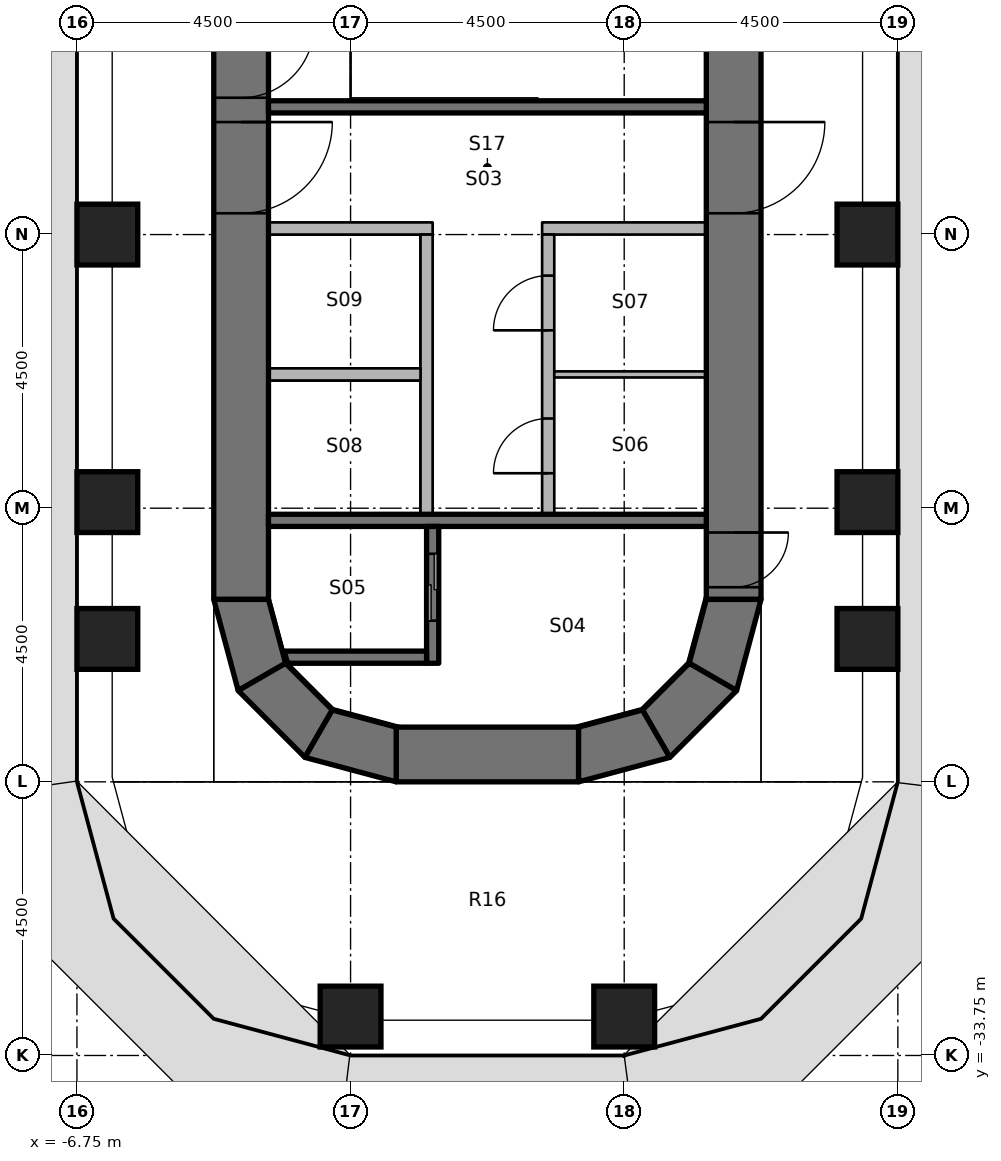
"""IFC4 building model, lengths in metres.
Left out: names, types, materials, properties, quantities, classifications, styles, units other than length and angle.
Written with IfcOpenShell. Run it as: python <this file> out.ifc"""

import sys

from ifc_helpers import new_model, si_unit, direction, frame, frame_2d, origin, origin_2d, place, context, subcontext, project, spatial, polyline, rectangle, outline, extrude, element, fill, save


model = new_model("IFC4")
c1 = context("Model", 3, precision=1e-05, world=origin(), true_north=direction((0.0, 1.0)))
c2 = subcontext(c1, "Body", "Model", "MODEL_VIEW")
j1 = project(units=[si_unit("LENGTHUNIT", "METRE"), si_unit("PLANEANGLEUNIT", "RADIAN")], contexts=[c1])
p1 = place(None, origin())
s1 = spatial("IfcSite", under=j1, at=p1, CompositionType="ELEMENT")
p2 = place(p1, origin())
s2 = spatial("IfcBuilding", under=s1, at=p2, CompositionType="ELEMENT")
p3 = place(p2, frame((0.0, 0.0, 56.4)))
s3 = spatial("IfcBuildingStorey", under=s2, at=p3, CompositionType="ELEMENT", Elevation=56.4)
for number, where, z_axis, x_axis in (
    (1, (-6.25, -26.9, 0.0), (0.0, 0.0, 1.0), (1.0, 0.0, 0.0)),
    (2, (-6.25, -24.65, 0.0), (0.0, 0.0, 1.0), (1.0, 0.0, 0.0)),
    (3, (-6.25, -20.25, 0.0), (0.0, 0.0, 1.0), (1.0, 0.0, 0.0)),
    (4, (-2.25, -33.11, 0.0), (0.0, 0.0, 1.0), (1.0, 0.0, 0.0)),
    (5, (2.25, -33.11, 0.0), (0.0, 0.0, 1.0), (1.0, 0.0, 0.0)),
    (6, (6.25, -26.9, 0.0), (0.0, 0.0, 1.0), (1.0, 0.0, 0.0)),
    (7, (6.25, -24.65, 0.0), (0.0, 0.0, 1.0), (1.0, 0.0, 0.0)),
    (8, (6.25, -20.25, 0.0), (0.0, 0.0, 1.0), (1.0, 0.0, 0.0)),
):
    element("IfcColumn", number, at=place(p3, frame(where, z_axis=z_axis, x_axis=x_axis)), inside=s3, PredefinedType="COLUMN", context=c2, shape_type="SweptSolid", body=[
        extrude(rectangle(XDim=1.0, YDim=1.0, at=origin_2d()), origin(), (0.0, 0.0, 1.0), 4.05),
    ])
p4 = place(p3, frame((-4.05, -11.25, 0.0), z_axis=(0.0, 0.0, 1.0), x_axis=(0.0, -1.0, 0.0)))
e9 = element("IfcWall", 9, at=p4, inside=s3, PredefinedType="SHEAR", context=c2, shape_type="SweptSolid", body=[
    extrude(rectangle(XDim=15.0, YDim=0.9, at=frame_2d((7.5, 0.0))), origin(), (0.0, 0.0, 1.0), 4.2),
])
p5 = place(p4, frame((7.15, 0.0, 0.0)))
e10 = element("IfcOpeningElement", 10, at=p5, cuts=e9, PredefinedType="OPENING", context=c2, shape_type="SweptSolid", body=[
    extrude(rectangle(XDim=1.5, YDim=2.3, at=frame_2d((0.75, 1.15))), frame((0.0, 0.46, 0.0), z_axis=(0.0, -1.0, 0.0), x_axis=(1.0, 0.0, 0.0)), (0.0, 0.0, 1.0), 0.92),
])
p6 = place(p4, frame((5.55, 0.0, 0.0)))
e11 = element("IfcOpeningElement", 11, at=p6, cuts=e9, PredefinedType="OPENING", context=c2, shape_type="SweptSolid", body=[
    extrude(rectangle(XDim=1.2, YDim=2.1, at=frame_2d((0.6, 1.05))), frame((0.0, 0.46, 0.0), z_axis=(0.0, -1.0, 0.0), x_axis=(1.0, 0.0, 0.0)), (0.0, 0.0, 1.0), 0.92),
])
p7 = place(p3, frame((4.05, -11.25, 0.0), z_axis=(0.0, 0.0, 1.0), x_axis=(0.0, -1.0, 0.0)))
e12 = element("IfcWall", 12, at=p7, inside=s3, PredefinedType="SHEAR", context=c2, shape_type="SweptSolid", body=[
    extrude(rectangle(XDim=15.0, YDim=0.9, at=frame_2d((7.5, 0.0))), origin(), (0.0, 0.0, 1.0), 4.2),
])
p8 = place(p7, frame((7.15, 0.0, 0.0)))
e13 = element("IfcOpeningElement", 13, at=p8, cuts=e12, PredefinedType="OPENING", context=c2, shape_type="SweptSolid", body=[
    extrude(rectangle(XDim=1.5, YDim=2.3, at=frame_2d((0.75, 1.15))), frame((0.0, 0.46, 0.0), z_axis=(0.0, -1.0, 0.0), x_axis=(1.0, 0.0, 0.0)), (0.0, 0.0, 1.0), 0.92),
])
p9 = place(p7, frame((13.9, 0.0, 0.0)))
e14 = element("IfcOpeningElement", 14, at=p9, cuts=e12, PredefinedType="OPENING", context=c2, shape_type="SweptSolid", body=[
    extrude(rectangle(XDim=0.9, YDim=2.1, at=frame_2d((0.45, 1.05))), frame((0.0, 0.46, 0.0), z_axis=(0.0, -1.0, 0.0), x_axis=(1.0, 0.0, 0.0)), (0.0, 0.0, 1.0), 0.92),
])
p10 = place(p7, frame((1.15, 0.0, 0.0)))
e15 = element("IfcOpeningElement", 15, at=p10, cuts=e12, PredefinedType="OPENING", context=c2, shape_type="SweptSolid", body=[
    extrude(rectangle(XDim=1.2, YDim=2.1, at=frame_2d((0.6, 1.05))), frame((0.0, 0.46, 0.0), z_axis=(0.0, -1.0, 0.0), x_axis=(1.0, 0.0, 0.0)), (0.0, 0.0, 1.0), 0.92),
])
p11 = place(p3, frame((-1.5, -28.8, 0.0), z_axis=(0.0, 0.0, 1.0), x_axis=(1.0, 0.0, 0.0)))
e16 = element("IfcWall", 16, at=p11, inside=s3, PredefinedType="SHEAR", context=c2, shape_type="SweptSolid", body=[
    extrude(rectangle(XDim=3.0, YDim=0.9, at=frame_2d((1.5, 0.0))), origin(), (0.0, 0.0, 1.0), 4.2),
])
p12 = place(p3, origin())
e17 = element("IfcWall", 17, at=p12, inside=s3, PredefinedType="SHEAR", context=c2, shape_type="SweptSolid", body=[
    extrude(outline(polyline([(-4.5, -26.25), (-4.098, -27.75), (-3.319, -27.3), (-3.6, -26.25), (-4.5, -26.25)])), origin(), (0.0, 0.0, 1.0), 4.2),
])
p13 = place(p3, origin())
e18 = element("IfcWall", 18, at=p13, inside=s3, PredefinedType="SHEAR", context=c2, shape_type="SweptSolid", body=[
    extrude(outline(polyline([(-4.098, -27.75), (-3.0, -28.848), (-2.55, -28.069), (-3.319, -27.3), (-4.098, -27.75)])), origin(), (0.0, 0.0, 1.0), 4.2),
])
p14 = place(p3, origin())
e19 = element("IfcWall", 19, at=p14, inside=s3, PredefinedType="SHEAR", context=c2, shape_type="SweptSolid", body=[
    extrude(outline(polyline([(-3.0, -28.848), (-1.5, -29.25), (-1.5, -28.35), (-2.55, -28.069), (-3.0, -28.848)])), origin(), (0.0, 0.0, 1.0), 4.2),
])
p15 = place(p3, origin())
e20 = element("IfcWall", 20, at=p15, inside=s3, PredefinedType="SHEAR", context=c2, shape_type="SweptSolid", body=[
    extrude(outline(polyline([(4.5, -26.25), (4.098, -27.75), (3.319, -27.3), (3.6, -26.25), (4.5, -26.25)])), origin(), (0.0, 0.0, 1.0), 4.2),
])
p16 = place(p3, origin())
e21 = element("IfcWall", 21, at=p16, inside=s3, PredefinedType="SHEAR", context=c2, shape_type="SweptSolid", body=[
    extrude(outline(polyline([(4.098, -27.75), (3.0, -28.848), (2.55, -28.069), (3.319, -27.3), (4.098, -27.75)])), origin(), (0.0, 0.0, 1.0), 4.2),
])
p17 = place(p3, origin())
e22 = element("IfcWall", 22, at=p17, inside=s3, PredefinedType="SHEAR", context=c2, shape_type="SweptSolid", body=[
    extrude(outline(polyline([(3.0, -28.848), (1.5, -29.25), (1.5, -28.35), (2.55, -28.069), (3.0, -28.848)])), origin(), (0.0, 0.0, 1.0), 4.2),
])
p18 = place(p3, frame((3.6, -24.95, 0.0), z_axis=(0.0, 0.0, 1.0), x_axis=(-1.0, 0.0, 0.0)))
e23 = element("IfcWall", 23, at=p18, inside=s3, PredefinedType="SHEAR", context=c2, shape_type="SweptSolid", body=[
    extrude(rectangle(XDim=7.2, YDim=0.2, at=frame_2d((3.6, 0.0))), origin(), (0.0, 0.0, 1.0), 4.05),
])
p19 = place(p3, frame((-0.9, -27.3, 0.0), z_axis=(0.0, 0.0, 1.0), x_axis=(0.0, 1.0, 0.0)))
e24 = element("IfcWall", 24, at=p19, inside=s3, PredefinedType="SHEAR", context=c2, shape_type="SweptSolid", body=[
    extrude(rectangle(XDim=2.25, YDim=0.2, at=frame_2d((1.125, 0.0))), origin(), (0.0, 0.0, 1.0), 4.05),
])
p20 = place(p19, frame((0.7, 0.0, 0.0)))
e25 = element("IfcOpeningElement", 25, at=p20, cuts=e24, PredefinedType="OPENING", context=c2, shape_type="SweptSolid", body=[
    extrude(rectangle(XDim=1.1, YDim=2.3, at=frame_2d((0.55, 1.15))), frame((0.0, 0.11, 0.0), z_axis=(0.0, -1.0, 0.0), x_axis=(1.0, 0.0, 0.0)), (0.0, 0.0, 1.0), 0.22),
])
p21 = place(p3, origin())
e26 = element("IfcWall", 26, at=p21, inside=s3, PredefinedType="SHEAR", context=c2, shape_type="SweptSolid", body=[
    extrude(outline(polyline([(-1.0, -27.1), (-3.341, -27.1), (-3.291, -27.284), (-3.275, -27.3), (-1.0, -27.3), (-1.0, -27.1)])), origin(), (0.0, 0.0, 1.0), 4.05),
])
p22 = place(p3, frame((3.6, -18.15, 0.0), z_axis=(0.0, 0.0, 1.0), x_axis=(-1.0, 0.0, 0.0)))
e27 = element("IfcWall", 27, at=p22, inside=s3, PredefinedType="SHEAR", context=c2, shape_type="SweptSolid", body=[
    extrude(rectangle(XDim=7.2, YDim=0.2, at=frame_2d((3.6, 0.0))), origin(), (0.0, 0.0, 1.0), 4.05),
])
p23 = place(p3, frame((3.6, -20.15, 0.0), z_axis=(0.0, 0.0, 1.0), x_axis=(-1.0, 0.0, 0.0)))
e28 = element("IfcWall", 28, at=p23, inside=s3, PredefinedType="PARTITIONING", context=c2, shape_type="SweptSolid", body=[
    extrude(rectangle(XDim=2.7, YDim=0.2, at=frame_2d((1.35, 0.0))), origin(), (0.0, 0.0, 1.0), 4.05),
])
p24 = place(p3, frame((1.0, -24.85, 0.0), z_axis=(0.0, 0.0, 1.0), x_axis=(0.0, 1.0, 0.0)))
e29 = element("IfcWall", 29, at=p24, inside=s3, PredefinedType="PARTITIONING", context=c2, shape_type="SweptSolid", body=[
    extrude(rectangle(XDim=4.6, YDim=0.2, at=frame_2d((2.3, 0.0))), origin(), (0.0, 0.0, 1.0), 4.05),
])
p25 = place(p24, frame((0.675, 0.0, 0.0)))
e30 = element("IfcOpeningElement", 30, at=p25, cuts=e29, PredefinedType="OPENING", context=c2, shape_type="SweptSolid", body=[
    extrude(rectangle(XDim=0.9, YDim=2.1, at=frame_2d((0.45, 1.05))), frame((0.0, 0.11, 0.0), z_axis=(0.0, -1.0, 0.0), x_axis=(1.0, 0.0, 0.0)), (0.0, 0.0, 1.0), 0.22),
])
p26 = place(p24, frame((3.025, 0.0, 0.0)))
e31 = element("IfcOpeningElement", 31, at=p26, cuts=e29, PredefinedType="OPENING", context=c2, shape_type="SweptSolid", body=[
    extrude(rectangle(XDim=0.9, YDim=2.1, at=frame_2d((0.45, 1.05))), frame((0.0, 0.11, 0.0), z_axis=(0.0, -1.0, 0.0), x_axis=(1.0, 0.0, 0.0)), (0.0, 0.0, 1.0), 0.22),
])
p27 = place(p3, frame((-0.9, -20.15, 0.0), z_axis=(0.0, 0.0, 1.0), x_axis=(-1.0, 0.0, 0.0)))
e32 = element("IfcWall", 32, at=p27, inside=s3, PredefinedType="PARTITIONING", context=c2, shape_type="SweptSolid", body=[
    extrude(rectangle(XDim=2.7, YDim=0.2, at=frame_2d((1.35, 0.0))), origin(), (0.0, 0.0, 1.0), 4.05),
])
p28 = place(p3, frame((-1.0, -24.85, 0.0), z_axis=(0.0, 0.0, 1.0), x_axis=(0.0, 1.0, 0.0)))
e33 = element("IfcWall", 33, at=p28, inside=s3, PredefinedType="PARTITIONING", context=c2, shape_type="SweptSolid", body=[
    extrude(rectangle(XDim=4.6, YDim=0.2, at=frame_2d((2.3, 0.0))), origin(), (0.0, 0.0, 1.0), 4.05),
])
p29 = place(p3, frame((3.6, -22.55, 0.0), z_axis=(0.0, 0.0, 1.0), x_axis=(-1.0, 0.0, 0.0)))
e34 = element("IfcWall", 34, at=p29, inside=s3, PredefinedType="PARTITIONING", context=c2, shape_type="SweptSolid", body=[
    extrude(rectangle(XDim=2.5, YDim=0.1, at=frame_2d((1.25, 0.0))), origin(), (0.0, 0.0, 1.0), 4.05),
])
p30 = place(p3, frame((-1.1, -22.55, 0.0), z_axis=(0.0, 0.0, 1.0), x_axis=(-1.0, 0.0, 0.0)))
e35 = element("IfcWall", 35, at=p30, inside=s3, PredefinedType="PARTITIONING", context=c2, shape_type="SweptSolid", body=[
    extrude(rectangle(XDim=2.5, YDim=0.2, at=frame_2d((1.25, 0.0))), origin(), (0.0, 0.0, 1.0), 4.05),
])
p31 = place(p8, origin())
e36 = element("IfcDoor", 36, at=p31, inside=s3, OperationType="DOUBLE_DOOR_SINGLE_SWING", PredefinedType="DOOR", context=c2, shape_type="SweptSolid", body=[
    extrude(rectangle(XDim=1.5, YDim=2.3, at=frame_2d((0.75, 1.15))), frame((0.0, 0.025, 0.0), z_axis=(0.0, -1.0, 0.0), x_axis=(1.0, 0.0, 0.0)), (0.0, 0.0, 1.0), 0.05),
])
fill(e13, e36)
p32 = place(p5, origin())
e37 = element("IfcDoor", 37, at=p32, inside=s3, OperationType="DOUBLE_DOOR_SINGLE_SWING", PredefinedType="DOOR", context=c2, shape_type="SweptSolid", body=[
    extrude(rectangle(XDim=1.5, YDim=2.3, at=frame_2d((0.75, 1.15))), frame((0.0, 0.025, 0.0), z_axis=(0.0, -1.0, 0.0), x_axis=(1.0, 0.0, 0.0)), (0.0, 0.0, 1.0), 0.05),
])
fill(e10, e37)
p33 = place(p9, origin())
e38 = element("IfcDoor", 38, at=p33, inside=s3, OperationType="SINGLE_SWING_RIGHT", PredefinedType="DOOR", context=c2, shape_type="SweptSolid", body=[
    extrude(rectangle(XDim=0.9, YDim=2.1, at=frame_2d((0.45, 1.05))), frame((0.0, 0.025, 0.0), z_axis=(0.0, -1.0, 0.0), x_axis=(1.0, 0.0, 0.0)), (0.0, 0.0, 1.0), 0.05),
])
fill(e14, e38)
p34 = place(p6, origin())
e39 = element("IfcDoor", 39, at=p34, inside=s3, OperationType="SINGLE_SWING_LEFT", PredefinedType="DOOR", context=c2, shape_type="SweptSolid", body=[
    extrude(rectangle(XDim=1.2, YDim=2.1, at=frame_2d((0.6, 1.05))), frame((0.0, 0.025, 0.0), z_axis=(0.0, -1.0, 0.0), x_axis=(1.0, 0.0, 0.0)), (0.0, 0.0, 1.0), 0.05),
])
fill(e11, e39)
p35 = place(p20, origin())
e40 = element("IfcDoor", 40, at=p35, inside=s3, OperationType="DOUBLE_DOOR_SLIDING", PredefinedType="DOOR", context=c2, shape_type="SweptSolid", body=[
    extrude(rectangle(XDim=1.1, YDim=2.3, at=frame_2d((0.55, 1.15))), frame((0.0, 0.025, 0.0), z_axis=(0.0, -1.0, 0.0), x_axis=(1.0, 0.0, 0.0)), (0.0, 0.0, 1.0), 0.05),
])
fill(e25, e40)
p36 = place(p25, origin())
e41 = element("IfcDoor", 41, at=p36, inside=s3, OperationType="SINGLE_SWING_LEFT", PredefinedType="DOOR", context=c2, shape_type="SweptSolid", body=[
    extrude(rectangle(XDim=0.9, YDim=2.1, at=frame_2d((0.45, 1.05))), frame((0.0, 0.025, 0.0), z_axis=(0.0, -1.0, 0.0), x_axis=(1.0, 0.0, 0.0)), (0.0, 0.0, 1.0), 0.05),
])
fill(e30, e41)
p37 = place(p26, origin())
e42 = element("IfcDoor", 42, at=p37, inside=s3, OperationType="SINGLE_SWING_LEFT", PredefinedType="DOOR", context=c2, shape_type="SweptSolid", body=[
    extrude(rectangle(XDim=0.9, YDim=2.1, at=frame_2d((0.45, 1.05))), frame((0.0, 0.025, 0.0), z_axis=(0.0, -1.0, 0.0), x_axis=(1.0, 0.0, 0.0)), (0.0, 0.0, 1.0), 0.05),
])
fill(e31, e42)
save(model, sys.argv[1])
